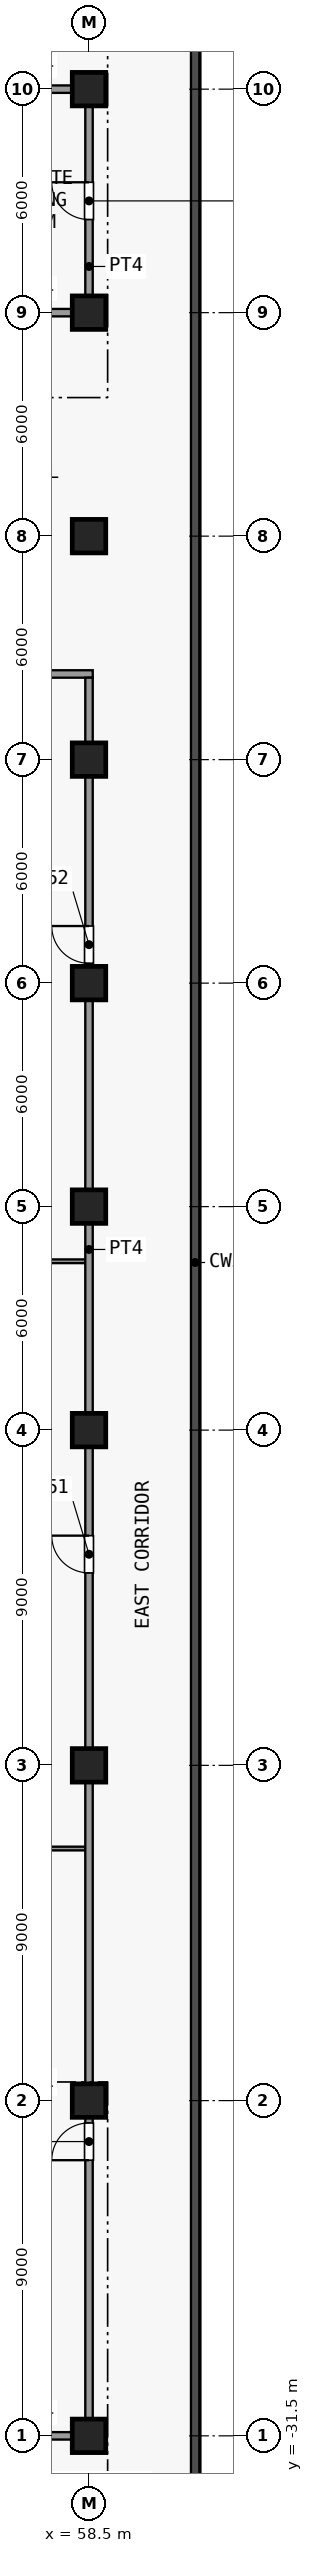
"""IFC4 building model, lengths in metres.
Left out: names, types, materials, properties, quantities, classifications, styles, units other than length and angle.
Written with IfcOpenShell. Run it as: python <this file> out.ifc"""

import sys

from ifc_helpers import new_model, si_unit, direction, frame, frame_2d, origin, origin_2d, place, context, subcontext, project, spatial, rectangle, extrude, element, fill, save


model = new_model("IFC4")
c1 = context("Model", 3, precision=1e-05, world=origin(), true_north=direction((0.0, 1.0)))
c2 = subcontext(c1, "Body", "Model", "MODEL_VIEW")
j1 = project(units=[si_unit("LENGTHUNIT", "METRE"), si_unit("PLANEANGLEUNIT", "RADIAN")], contexts=[c1])
p1 = place(None, origin())
s1 = spatial("IfcSite", under=j1, at=p1, CompositionType="ELEMENT")
p2 = place(p1, origin())
s2 = spatial("IfcBuilding", under=s1, at=p2, CompositionType="ELEMENT")
p3 = place(p2, frame((0.0, 0.0, 23.5)))
s3 = spatial("IfcBuildingStorey", under=s2, at=p3, CompositionType="ELEMENT", Elevation=23.5)
for number, where, z_axis, x_axis in (
    (1, (58.5, -31.5, 0.0), (0.0, 0.0, 1.0), (1.0, 0.0, 0.0)),
    (2, (58.5, -22.5, 0.0), (0.0, 0.0, 1.0), (1.0, 0.0, 0.0)),
    (3, (58.5, -13.5, 0.0), (0.0, 0.0, 1.0), (1.0, 0.0, 0.0)),
    (4, (58.5, -4.5, 0.0), (0.0, 0.0, 1.0), (1.0, 0.0, 0.0)),
    (5, (58.5, 1.5, 0.0), (0.0, 0.0, 1.0), (1.0, 0.0, 0.0)),
    (6, (58.5, 7.5, 0.0), (0.0, 0.0, 1.0), (1.0, 0.0, 0.0)),
    (7, (58.5, 13.5, 0.0), (0.0, 0.0, 1.0), (1.0, 0.0, 0.0)),
    (8, (58.5, 19.5, 0.0), (0.0, 0.0, 1.0), (1.0, 0.0, 0.0)),
    (9, (58.5, 25.5, 0.0), (0.0, 0.0, 1.0), (1.0, 0.0, 0.0)),
    (10, (58.5, 31.5, 0.0), (0.0, 0.0, 1.0), (1.0, 0.0, 0.0)),
):
    element("IfcColumn", number, at=place(p3, frame(where, z_axis=z_axis, x_axis=x_axis)), inside=s3, PredefinedType="COLUMN", context=c2, shape_type="SweptSolid", body=[
        extrude(rectangle(XDim=0.9, YDim=0.9, at=origin_2d()), origin(), (0.0, 0.0, 1.0), 4.5),
    ])
p4 = place(p3, frame((55.6, -31.5, 0.0), z_axis=(0.0, 0.0, 1.0), x_axis=(1.0, 0.0, 0.0)))
e11 = element("IfcWall", 11, at=p4, inside=s3, PredefinedType="PARTITIONING", context=c2, shape_type="SweptSolid", body=[
    extrude(rectangle(XDim=3.0, YDim=0.2, at=frame_2d((1.5, 0.0))), origin(), (0.0, 0.0, 1.0), 4.15),
])
for number, where, z_axis, x_axis in (
    (12, (52.6, -15.733, 0.0), (0.0, 0.0, 1.0), (1.0, 0.0, 0.0)),
    (13, (52.6, 0.033, 0.0), (0.0, 0.0, 1.0), (1.0, 0.0, 0.0)),
):
    element("IfcWall", number, at=place(p3, frame(where, z_axis=z_axis, x_axis=x_axis)), inside=s3, PredefinedType="PARTITIONING", context=c2, shape_type="SweptSolid", body=[
        extrude(rectangle(XDim=5.8, YDim=0.1, at=frame_2d((2.9, 0.0))), origin(), (0.0, 0.0, 1.0), 4.15),
    ])
p5 = place(p3, frame((52.4, 15.8, 0.0), z_axis=(0.0, 0.0, 1.0), x_axis=(1.0, 0.0, 0.0)))
e14 = element("IfcWall", 14, at=p5, inside=s3, PredefinedType="PARTITIONING", context=c2, shape_type="SweptSolid", body=[
    extrude(rectangle(XDim=6.2, YDim=0.2, at=frame_2d((3.1, 0.0))), origin(), (0.0, 0.0, 1.0), 4.15),
])
for number, where, z_axis, x_axis in (
    (15, (55.6, 25.5, 0.0), (0.0, 0.0, 1.0), (1.0, 0.0, 0.0)),
    (16, (55.6, 31.5, 0.0), (0.0, 0.0, 1.0), (1.0, 0.0, 0.0)),
):
    element("IfcWall", number, at=place(p3, frame(where, z_axis=z_axis, x_axis=x_axis)), inside=s3, PredefinedType="PARTITIONING", context=c2, shape_type="SweptSolid", body=[
        extrude(rectangle(XDim=3.0, YDim=0.2, at=frame_2d((1.5, 0.0))), origin(), (0.0, 0.0, 1.0), 4.15),
    ])
p6 = place(p3, frame((58.5, -31.4, 0.0), z_axis=(0.0, 0.0, 1.0), x_axis=(0.0, 1.0, 0.0)))
e17 = element("IfcWall", 17, at=p6, inside=s3, PredefinedType="PARTITIONING", context=c2, shape_type="SweptSolid", body=[
    extrude(rectangle(XDim=47.1, YDim=0.2, at=frame_2d((23.55, 0.0))), origin(), (0.0, 0.0, 1.0), 4.15),
])
p7 = place(p6, frame((7.3, 0.0, 0.0)))
e18 = element("IfcOpeningElement", 18, at=p7, cuts=e17, PredefinedType="OPENING", context=c2, shape_type="SweptSolid", body=[
    extrude(rectangle(XDim=1.0, YDim=2.1, at=frame_2d((0.5, 1.05))), frame((0.0, 0.11, 0.0), z_axis=(0.0, -1.0, 0.0), x_axis=(1.0, 0.0, 0.0)), (0.0, 0.0, 1.0), 0.22),
])
p8 = place(p6, frame((23.067, 0.0, 0.0)))
e19 = element("IfcOpeningElement", 19, at=p8, cuts=e17, PredefinedType="OPENING", context=c2, shape_type="SweptSolid", body=[
    extrude(rectangle(XDim=1.0, YDim=2.1, at=frame_2d((0.5, 1.05))), frame((0.0, 0.11, 0.0), z_axis=(0.0, -1.0, 0.0), x_axis=(1.0, 0.0, 0.0)), (0.0, 0.0, 1.0), 0.22),
])
p9 = place(p6, frame((39.433, 0.0, 0.0)))
e20 = element("IfcOpeningElement", 20, at=p9, cuts=e17, PredefinedType="OPENING", context=c2, shape_type="SweptSolid", body=[
    extrude(rectangle(XDim=1.0, YDim=2.1, at=frame_2d((0.5, 1.05))), frame((0.0, 0.11, 0.0), z_axis=(0.0, -1.0, 0.0), x_axis=(1.0, 0.0, 0.0)), (0.0, 0.0, 1.0), 0.22),
])
p10 = place(p3, frame((58.5, 25.6, 0.0), z_axis=(0.0, 0.0, 1.0), x_axis=(0.0, 1.0, 0.0)))
e21 = element("IfcWall", 21, at=p10, inside=s3, PredefinedType="PARTITIONING", context=c2, shape_type="SweptSolid", body=[
    extrude(rectangle(XDim=5.8, YDim=0.2, at=frame_2d((2.9, 0.0))), origin(), (0.0, 0.0, 1.0), 4.15),
])
p11 = place(p10, frame((2.4, 0.0, 0.0)))
e22 = element("IfcOpeningElement", 22, at=p11, cuts=e21, PredefinedType="OPENING", context=c2, shape_type="SweptSolid", body=[
    extrude(rectangle(XDim=1.0, YDim=2.1, at=frame_2d((0.5, 1.05))), frame((0.0, 0.11, 0.0), z_axis=(0.0, -1.0, 0.0), x_axis=(1.0, 0.0, 0.0)), (0.0, 0.0, 1.0), 0.22),
])
p12 = place(p7, origin())
e23 = element("IfcDoor", 23, at=p12, inside=s3, OperationType="SINGLE_SWING_RIGHT", PredefinedType="DOOR", context=c2, shape_type="SweptSolid", body=[
    extrude(rectangle(XDim=1.0, YDim=2.1, at=frame_2d((0.5, 1.05))), frame((0.0, 0.025, 0.0), z_axis=(0.0, -1.0, 0.0), x_axis=(1.0, 0.0, 0.0)), (0.0, 0.0, 1.0), 0.05),
])
fill(e18, e23)
p13 = place(p8, origin())
e24 = element("IfcDoor", 24, at=p13, inside=s3, OperationType="SINGLE_SWING_LEFT", PredefinedType="DOOR", context=c2, shape_type="SweptSolid", body=[
    extrude(rectangle(XDim=1.0, YDim=2.1, at=frame_2d((0.5, 1.05))), frame((0.0, 0.025, 0.0), z_axis=(0.0, -1.0, 0.0), x_axis=(1.0, 0.0, 0.0)), (0.0, 0.0, 1.0), 0.05),
])
fill(e19, e24)
p14 = place(p9, origin())
e25 = element("IfcDoor", 25, at=p14, inside=s3, OperationType="SINGLE_SWING_LEFT", PredefinedType="DOOR", context=c2, shape_type="SweptSolid", body=[
    extrude(rectangle(XDim=1.0, YDim=2.1, at=frame_2d((0.5, 1.05))), frame((0.0, 0.025, 0.0), z_axis=(0.0, -1.0, 0.0), x_axis=(1.0, 0.0, 0.0)), (0.0, 0.0, 1.0), 0.05),
])
fill(e20, e25)
p15 = place(p11, origin())
e26 = element("IfcDoor", 26, at=p15, inside=s3, OperationType="SINGLE_SWING_LEFT", PredefinedType="DOOR", context=c2, shape_type="SweptSolid", body=[
    extrude(rectangle(XDim=1.0, YDim=2.1, at=frame_2d((0.5, 1.05))), frame((0.0, 0.025, 0.0), z_axis=(0.0, -1.0, 0.0), x_axis=(1.0, 0.0, 0.0)), (0.0, 0.0, 1.0), 0.05),
])
fill(e22, e26)
save(model, sys.argv[1])
